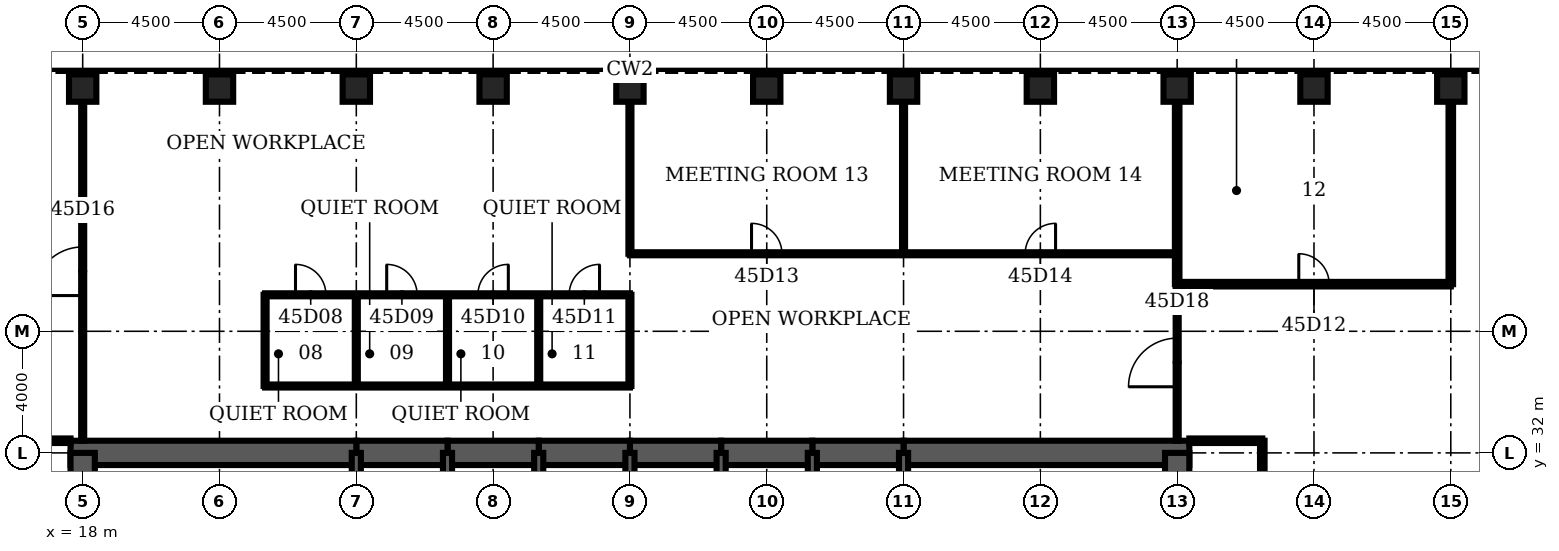
"""IFC4 building model, lengths in metres.
Left out: names, types, materials, properties, quantities, classifications, styles, units other than length and angle.
Written with IfcOpenShell. Run it as: python <this file> out.ifc"""

import sys

from ifc_helpers import new_model, si_unit, direction, frame, frame_2d, origin, origin_2d, place, context, subcontext, project, spatial, rectangle, hollow_rectangle, extrude, element, fill, save


model = new_model("IFC4")
c1 = context("Model", 3, precision=1e-05, world=origin(), true_north=direction((0.0, 1.0)))
c2 = subcontext(c1, "Body", "Model", "MODEL_VIEW")
j1 = project(units=[si_unit("LENGTHUNIT", "METRE"), si_unit("PLANEANGLEUNIT", "RADIAN")], contexts=[c1])
p1 = place(None, origin())
s1 = spatial("IfcSite", under=j1, at=p1, CompositionType="ELEMENT")
p2 = place(p1, origin())
s2 = spatial("IfcBuilding", under=s1, at=p2, CompositionType="ELEMENT")
p3 = place(p2, frame((0.0, 0.0, 202.6)))
s3 = spatial("IfcBuildingStorey", under=s2, at=p3, CompositionType="ELEMENT", Elevation=202.6)
for number, where, z_axis, x_axis in (
    (1, (63.0, 44.0, 0.0), (0.0, 0.0, 1.0), (0.0, 1.0, 0.0)),
    (2, (58.5, 44.0, 0.0), (0.0, 0.0, 1.0), (0.0, 1.0, 0.0)),
    (3, (54.0, 44.0, 0.0), (0.0, 0.0, 1.0), (0.0, 1.0, 0.0)),
    (4, (49.5, 44.0, 0.0), (0.0, 0.0, 1.0), (0.0, 1.0, 0.0)),
    (5, (45.0, 44.0, 0.0), (0.0, 0.0, 1.0), (0.0, 1.0, 0.0)),
    (6, (40.5, 44.0, 0.0), (0.0, 0.0, 1.0), (0.0, 1.0, 0.0)),
    (7, (36.0, 44.0, 0.0), (0.0, 0.0, 1.0), (0.0, 1.0, 0.0)),
    (8, (31.5, 44.0, 0.0), (0.0, 0.0, 1.0), (0.0, 1.0, 0.0)),
    (9, (27.0, 44.0, 0.0), (0.0, 0.0, 1.0), (0.0, 1.0, 0.0)),
    (10, (22.5, 44.0, 0.0), (0.0, 0.0, 1.0), (0.0, 1.0, 0.0)),
    (11, (18.0, 44.0, 0.0), (0.0, 0.0, 1.0), (0.0, 1.0, 0.0)),
):
    element("IfcColumn", number, at=place(p3, frame(where, z_axis=z_axis, x_axis=x_axis)), inside=s3, PredefinedType="COLUMN", context=c2, shape_type="SweptSolid", body=[
        extrude(hollow_rectangle(XDim=0.9, YDim=0.9, WallThickness=0.09, at=origin_2d()), origin(), (0.0, 0.0, 1.0), 4.2),
    ])
p4 = place(p3, frame((54.4, 32.0, 0.0), z_axis=(0.0, 0.0, 1.0), x_axis=(-1.0, 0.0, 0.0)))
e12 = element("IfcWall", 12, at=p4, inside=s3, PredefinedType="SHEAR", context=c2, shape_type="SweptSolid", body=[
    extrude(rectangle(XDim=9.4, YDim=0.8, at=frame_2d((4.7, 0.0))), origin(), (0.0, 0.0, 1.0), 4.2),
])
for number, where, z_axis, x_axis in (
    (13, (45.0, 32.0, 0.0), (0.0, 0.0, 1.0), (-1.0, 0.0, 0.0)),
    (14, (42.0, 32.0, 0.0), (0.0, 0.0, 1.0), (-1.0, 0.0, 0.0)),
    (15, (39.0, 32.0, 0.0), (0.0, 0.0, 1.0), (-1.0, 0.0, 0.0)),
    (16, (36.0, 32.0, 0.0), (0.0, 0.0, 1.0), (-1.0, 0.0, 0.0)),
    (17, (33.0, 32.0, 0.0), (0.0, 0.0, 1.0), (-1.0, 0.0, 0.0)),
    (18, (30.0, 32.0, 0.0), (0.0, 0.0, 1.0), (-1.0, 0.0, 0.0)),
):
    element("IfcWall", number, at=place(p3, frame(where, z_axis=z_axis, x_axis=x_axis)), inside=s3, PredefinedType="SHEAR", context=c2, shape_type="SweptSolid", body=[
        extrude(rectangle(XDim=3.0, YDim=0.8, at=frame_2d((1.5, 0.0))), origin(), (0.0, 0.0, 1.0), 4.2),
    ])
p5 = place(p3, frame((27.0, 32.0, 0.0), z_axis=(0.0, 0.0, 1.0), x_axis=(-1.0, 0.0, 0.0)))
e19 = element("IfcWall", 19, at=p5, inside=s3, PredefinedType="SHEAR", context=c2, shape_type="SweptSolid", body=[
    extrude(rectangle(XDim=9.4, YDim=0.8, at=frame_2d((4.7, 0.0))), origin(), (0.0, 0.0, 1.0), 4.2),
])
for number, where, z_axis, x_axis in (
    (20, (18.0, 32.0, 0.0), (0.0, 0.0, 1.0), (0.0, -1.0, 0.0)),
    (21, (54.0, 28.8, 0.0), (0.0, 0.0, 1.0), (0.0, 1.0, 0.0)),
):
    element("IfcWall", number, at=place(p3, frame(where, z_axis=z_axis, x_axis=x_axis)), inside=s3, PredefinedType="SHEAR", context=c2, shape_type="SweptSolid", body=[
        extrude(rectangle(XDim=3.2, YDim=0.8, at=frame_2d((1.6, 0.0))), origin(), (0.0, 0.0, 1.0), 4.2),
    ])
for number, where, z_axis, x_axis in (
    (22, (27.0, 28.8, 0.0), (0.0, 0.0, 1.0), (0.0, 1.0, 0.0)),
    (23, (30.0, 28.8, 0.0), (0.0, 0.0, 1.0), (0.0, 1.0, 0.0)),
    (24, (33.0, 28.8, 0.0), (0.0, 0.0, 1.0), (0.0, 1.0, 0.0)),
    (25, (36.0, 28.8, 0.0), (0.0, 0.0, 1.0), (0.0, 1.0, 0.0)),
    (26, (39.0, 28.8, 0.0), (0.0, 0.0, 1.0), (0.0, 1.0, 0.0)),
    (27, (42.0, 28.8, 0.0), (0.0, 0.0, 1.0), (0.0, 1.0, 0.0)),
    (28, (45.0, 28.8, 0.0), (0.0, 0.0, 1.0), (0.0, 1.0, 0.0)),
):
    element("IfcWall", number, at=place(p3, frame(where, z_axis=z_axis, x_axis=x_axis)), inside=s3, PredefinedType="SOLIDWALL", context=c2, shape_type="SweptSolid", body=[
        extrude(rectangle(XDim=3.2, YDim=0.3, at=frame_2d((1.6, 0.0))), origin(), (0.0, 0.0, 1.0), 4.2),
    ])
for number, where, z_axis, x_axis in (
    (29, (15.2, 32.4, 0.0), (0.0, 0.0, 1.0), (1.0, 0.0, 0.0)),
    (30, (54.4, 32.4, 0.0), (0.0, 0.0, 1.0), (1.0, 0.0, 0.0)),
):
    element("IfcWall", number, at=place(p3, frame(where, z_axis=z_axis, x_axis=x_axis)), inside=s3, PredefinedType="PARTITIONING", context=c2, shape_type="SweptSolid", body=[
        extrude(rectangle(XDim=2.4, YDim=0.15, at=frame_2d((1.2, 0.0))), origin(), (0.0, 0.0, 1.0), 3.0),
    ])
p6 = place(p3, frame((24.0, 34.2, 0.0), z_axis=(0.0, 0.0, 1.0), x_axis=(1.0, 0.0, 0.0)))
e31 = element("IfcWall", 31, at=p6, inside=s3, PredefinedType="PARTITIONING", context=c2, shape_type="SweptSolid", body=[
    extrude(rectangle(XDim=12.0, YDim=0.1, at=frame_2d((6.0, 0.0))), origin(), (0.0, 0.0, 1.0), 3.0),
])
p7 = place(p3, frame((24.0, 37.2, 0.0), z_axis=(0.0, 0.0, 1.0), x_axis=(1.0, 0.0, 0.0)))
e32 = element("IfcWall", 32, at=p7, inside=s3, PredefinedType="PARTITIONING", context=c2, shape_type="SweptSolid", body=[
    extrude(rectangle(XDim=12.0, YDim=0.1, at=frame_2d((6.0, 0.0))), origin(), (0.0, 0.0, 1.0), 3.0),
])
p8 = place(p7, frame((1.0, 0.0, 0.0)))
e33 = element("IfcOpeningElement", 33, at=p8, cuts=e32, PredefinedType="OPENING", context=c2, shape_type="SweptSolid", body=[
    extrude(rectangle(XDim=1.0, YDim=2.1, at=frame_2d((0.5, 1.05))), frame((0.0, 0.06, 0.0), z_axis=(0.0, -1.0, 0.0), x_axis=(1.0, 0.0, 0.0)), (0.0, 0.0, 1.0), 0.12),
])
p9 = place(p7, frame((4.0, 0.0, 0.0)))
e34 = element("IfcOpeningElement", 34, at=p9, cuts=e32, PredefinedType="OPENING", context=c2, shape_type="SweptSolid", body=[
    extrude(rectangle(XDim=1.0, YDim=2.1, at=frame_2d((0.5, 1.05))), frame((0.0, 0.06, 0.0), z_axis=(0.0, -1.0, 0.0), x_axis=(1.0, 0.0, 0.0)), (0.0, 0.0, 1.0), 0.12),
])
p10 = place(p7, frame((7.0, 0.0, 0.0)))
e35 = element("IfcOpeningElement", 35, at=p10, cuts=e32, PredefinedType="OPENING", context=c2, shape_type="SweptSolid", body=[
    extrude(rectangle(XDim=1.0, YDim=2.1, at=frame_2d((0.5, 1.05))), frame((0.0, 0.06, 0.0), z_axis=(0.0, -1.0, 0.0), x_axis=(1.0, 0.0, 0.0)), (0.0, 0.0, 1.0), 0.12),
])
p11 = place(p7, frame((10.0, 0.0, 0.0)))
e36 = element("IfcOpeningElement", 36, at=p11, cuts=e32, PredefinedType="OPENING", context=c2, shape_type="SweptSolid", body=[
    extrude(rectangle(XDim=1.0, YDim=2.1, at=frame_2d((0.5, 1.05))), frame((0.0, 0.06, 0.0), z_axis=(0.0, -1.0, 0.0), x_axis=(1.0, 0.0, 0.0)), (0.0, 0.0, 1.0), 0.12),
])
p12 = place(p3, frame((54.0, 37.55, 0.0), z_axis=(0.0, 0.0, 1.0), x_axis=(1.0, 0.0, 0.0)))
e37 = element("IfcWall", 37, at=p12, inside=s3, PredefinedType="PARTITIONING", context=c2, shape_type="SweptSolid", body=[
    extrude(rectangle(XDim=9.0, YDim=0.15, at=frame_2d((4.5, 0.0))), origin(), (0.0, 0.0, 1.0), 3.0),
])
p13 = place(p12, frame((4.0, 0.0, 0.0)))
e38 = element("IfcOpeningElement", 38, at=p13, cuts=e37, PredefinedType="OPENING", context=c2, shape_type="SweptSolid", body=[
    extrude(rectangle(XDim=1.0, YDim=2.1, at=frame_2d((0.5, 1.05))), frame((0.0, 0.085, 0.0), z_axis=(0.0, -1.0, 0.0), x_axis=(1.0, 0.0, 0.0)), (0.0, 0.0, 1.0), 0.17),
])
p14 = place(p3, frame((36.0, 38.55, 0.0), z_axis=(0.0, 0.0, 1.0), x_axis=(1.0, 0.0, 0.0)))
e39 = element("IfcWall", 39, at=p14, inside=s3, PredefinedType="PARTITIONING", context=c2, shape_type="SweptSolid", body=[
    extrude(rectangle(XDim=18.0, YDim=0.1, at=frame_2d((9.0, 0.0))), origin(), (0.0, 0.0, 1.0), 3.0),
])
p15 = place(p14, frame((4.0, 0.0, 0.0)))
e40 = element("IfcOpeningElement", 40, at=p15, cuts=e39, PredefinedType="OPENING", context=c2, shape_type="SweptSolid", body=[
    extrude(rectangle(XDim=1.0, YDim=2.1, at=frame_2d((0.5, 1.05))), frame((0.0, 0.06, 0.0), z_axis=(0.0, -1.0, 0.0), x_axis=(1.0, 0.0, 0.0)), (0.0, 0.0, 1.0), 0.12),
])
p16 = place(p14, frame((13.0, 0.0, 0.0)))
e41 = element("IfcOpeningElement", 41, at=p16, cuts=e39, PredefinedType="OPENING", context=c2, shape_type="SweptSolid", body=[
    extrude(rectangle(XDim=1.0, YDim=2.1, at=frame_2d((0.5, 1.05))), frame((0.0, 0.06, 0.0), z_axis=(0.0, -1.0, 0.0), x_axis=(1.0, 0.0, 0.0)), (0.0, 0.0, 1.0), 0.12),
])
p17 = place(p3, frame((18.0, 32.4, 0.0), z_axis=(0.0, 0.0, 1.0), x_axis=(0.0, 1.0, 0.0)))
e42 = element("IfcWall", 42, at=p17, inside=s3, PredefinedType="PARTITIONING", context=c2, shape_type="SweptSolid", body=[
    extrude(rectangle(XDim=11.15, YDim=0.1, at=frame_2d((5.575, 0.0))), origin(), (0.0, 0.0, 1.0), 3.0),
])
p18 = place(p17, frame((4.775, 0.0, 0.0)))
e43 = element("IfcOpeningElement", 43, at=p18, cuts=e42, PredefinedType="OPENING", context=c2, shape_type="SweptSolid", body=[
    extrude(rectangle(XDim=1.6, YDim=2.1, at=frame_2d((0.8, 1.05))), frame((0.0, 0.06, 0.0), z_axis=(0.0, -1.0, 0.0), x_axis=(1.0, 0.0, 0.0)), (0.0, 0.0, 1.0), 0.12),
])
for number, where, z_axis, x_axis in (
    (44, (24.0, 34.2, 0.0), (0.0, 0.0, 1.0), (0.0, 1.0, 0.0)),
    (45, (27.0, 34.2, 0.0), (0.0, 0.0, 1.0), (0.0, 1.0, 0.0)),
    (46, (30.0, 34.2, 0.0), (0.0, 0.0, 1.0), (0.0, 1.0, 0.0)),
    (47, (33.0, 34.2, 0.0), (0.0, 0.0, 1.0), (0.0, 1.0, 0.0)),
    (48, (36.0, 34.2, 0.0), (0.0, 0.0, 1.0), (0.0, 1.0, 0.0)),
):
    element("IfcWall", number, at=place(p3, frame(where, z_axis=z_axis, x_axis=x_axis)), inside=s3, PredefinedType="PARTITIONING", context=c2, shape_type="SweptSolid", body=[
        extrude(rectangle(XDim=3.0, YDim=0.1, at=frame_2d((1.5, 0.0))), origin(), (0.0, 0.0, 1.0), 3.0),
    ])
for number, where, z_axis, x_axis in (
    (49, (36.0, 38.55, 0.0), (0.0, 0.0, 1.0), (0.0, 1.0, 0.0)),
    (50, (45.0, 38.55, 0.0), (0.0, 0.0, 1.0), (0.0, 1.0, 0.0)),
):
    element("IfcWall", number, at=place(p3, frame(where, z_axis=z_axis, x_axis=x_axis)), inside=s3, PredefinedType="PARTITIONING", context=c2, shape_type="SweptSolid", body=[
        extrude(rectangle(XDim=5.0, YDim=0.1, at=frame_2d((2.5, 0.0))), origin(), (0.0, 0.0, 1.0), 3.0),
    ])
p19 = place(p3, frame((54.0, 32.4, 0.0), z_axis=(0.0, 0.0, 1.0), x_axis=(0.0, 1.0, 0.0)))
e51 = element("IfcWall", 51, at=p19, inside=s3, PredefinedType="PARTITIONING", context=c2, shape_type="SweptSolid", body=[
    extrude(rectangle(XDim=5.15, YDim=0.1, at=frame_2d((2.575, 0.0))), origin(), (0.0, 0.0, 1.0), 3.0),
])
p20 = place(p19, frame((1.775, 0.0, 0.0)))
e52 = element("IfcOpeningElement", 52, at=p20, cuts=e51, PredefinedType="OPENING", context=c2, shape_type="SweptSolid", body=[
    extrude(rectangle(XDim=1.6, YDim=2.1, at=frame_2d((0.8, 1.05))), frame((0.0, 0.06, 0.0), z_axis=(0.0, -1.0, 0.0), x_axis=(1.0, 0.0, 0.0)), (0.0, 0.0, 1.0), 0.12),
])
p21 = place(p3, frame((54.0, 37.55, 0.0), z_axis=(0.0, 0.0, 1.0), x_axis=(0.0, 1.0, 0.0)))
e53 = element("IfcWall", 53, at=p21, inside=s3, PredefinedType="PARTITIONING", context=c2, shape_type="SweptSolid", body=[
    extrude(rectangle(XDim=6.0, YDim=0.15, at=frame_2d((3.0, 0.0))), origin(), (0.0, 0.0, 1.0), 3.0),
])
p22 = place(p3, frame((56.8, 13.8, 0.0), z_axis=(0.0, 0.0, 1.0), x_axis=(0.0, 1.0, 0.0)))
e54 = element("IfcWall", 54, at=p22, inside=s3, PredefinedType="PARTITIONING", context=c2, shape_type="SweptSolid", body=[
    extrude(rectangle(XDim=18.6, YDim=0.15, at=frame_2d((9.3, 0.0))), origin(), (0.0, 0.0, 1.0), 3.0),
])
p23 = place(p22, frame((8.7, 0.0, 0.0)))
e55 = element("IfcOpeningElement", 55, at=p23, cuts=e54, PredefinedType="OPENING", context=c2, shape_type="SweptSolid", body=[
    extrude(rectangle(XDim=1.2, YDim=2.1, at=frame_2d((0.6, 1.05))), frame((0.0, 0.085, 0.0), z_axis=(0.0, -1.0, 0.0), x_axis=(1.0, 0.0, 0.0)), (0.0, 0.0, 1.0), 0.17),
])
p24 = place(p3, frame((63.0, 37.55, 0.0), z_axis=(0.0, 0.0, 1.0), x_axis=(0.0, 1.0, 0.0)))
e56 = element("IfcWall", 56, at=p24, inside=s3, PredefinedType="PARTITIONING", context=c2, shape_type="SweptSolid", body=[
    extrude(rectangle(XDim=6.0, YDim=0.15, at=frame_2d((3.0, 0.0))), origin(), (0.0, 0.0, 1.0), 3.0),
])
p25 = place(p8, origin())
e57 = element("IfcDoor", 57, at=p25, inside=s3, OperationType="SINGLE_SWING_LEFT", PredefinedType="DOOR", context=c2, shape_type="SweptSolid", body=[
    extrude(rectangle(XDim=1.0, YDim=2.1, at=frame_2d((0.5, 1.05))), frame((0.0, 0.025, 0.0), z_axis=(0.0, -1.0, 0.0), x_axis=(1.0, 0.0, 0.0)), (0.0, 0.0, 1.0), 0.05),
])
fill(e33, e57)
p26 = place(p9, origin())
e58 = element("IfcDoor", 58, at=p26, inside=s3, OperationType="SINGLE_SWING_LEFT", PredefinedType="DOOR", context=c2, shape_type="SweptSolid", body=[
    extrude(rectangle(XDim=1.0, YDim=2.1, at=frame_2d((0.5, 1.05))), frame((0.0, 0.025, 0.0), z_axis=(0.0, -1.0, 0.0), x_axis=(1.0, 0.0, 0.0)), (0.0, 0.0, 1.0), 0.05),
])
fill(e34, e58)
p27 = place(p10, origin())
e59 = element("IfcDoor", 59, at=p27, inside=s3, OperationType="SINGLE_SWING_RIGHT", PredefinedType="DOOR", context=c2, shape_type="SweptSolid", body=[
    extrude(rectangle(XDim=1.0, YDim=2.1, at=frame_2d((0.5, 1.05))), frame((0.0, 0.025, 0.0), z_axis=(0.0, -1.0, 0.0), x_axis=(1.0, 0.0, 0.0)), (0.0, 0.0, 1.0), 0.05),
])
fill(e35, e59)
p28 = place(p11, origin())
e60 = element("IfcDoor", 60, at=p28, inside=s3, OperationType="SINGLE_SWING_RIGHT", PredefinedType="DOOR", context=c2, shape_type="SweptSolid", body=[
    extrude(rectangle(XDim=1.0, YDim=2.1, at=frame_2d((0.5, 1.05))), frame((0.0, 0.025, 0.0), z_axis=(0.0, -1.0, 0.0), x_axis=(1.0, 0.0, 0.0)), (0.0, 0.0, 1.0), 0.05),
])
fill(e36, e60)
p29 = place(p13, origin())
e61 = element("IfcDoor", 61, at=p29, inside=s3, OperationType="SINGLE_SWING_LEFT", PredefinedType="DOOR", context=c2, shape_type="SweptSolid", body=[
    extrude(rectangle(XDim=1.0, YDim=2.1, at=frame_2d((0.5, 1.05))), frame((0.0, 0.025, 0.0), z_axis=(0.0, -1.0, 0.0), x_axis=(1.0, 0.0, 0.0)), (0.0, 0.0, 1.0), 0.05),
])
fill(e38, e61)
p30 = place(p15, origin())
e62 = element("IfcDoor", 62, at=p30, inside=s3, OperationType="SINGLE_SWING_LEFT", PredefinedType="DOOR", context=c2, shape_type="SweptSolid", body=[
    extrude(rectangle(XDim=1.0, YDim=2.1, at=frame_2d((0.5, 1.05))), frame((0.0, 0.025, 0.0), z_axis=(0.0, -1.0, 0.0), x_axis=(1.0, 0.0, 0.0)), (0.0, 0.0, 1.0), 0.05),
])
fill(e40, e62)
p31 = place(p16, origin())
e63 = element("IfcDoor", 63, at=p31, inside=s3, OperationType="SINGLE_SWING_RIGHT", PredefinedType="DOOR", context=c2, shape_type="SweptSolid", body=[
    extrude(rectangle(XDim=1.0, YDim=2.1, at=frame_2d((0.5, 1.05))), frame((0.0, 0.025, 0.0), z_axis=(0.0, -1.0, 0.0), x_axis=(1.0, 0.0, 0.0)), (0.0, 0.0, 1.0), 0.05),
])
fill(e41, e63)
p32 = place(p18, origin())
e64 = element("IfcDoor", 64, at=p32, inside=s3, OperationType="SINGLE_SWING_LEFT", PredefinedType="DOOR", context=c2, shape_type="SweptSolid", body=[
    extrude(rectangle(XDim=1.6, YDim=2.1, at=frame_2d((0.8, 1.05))), frame((0.0, 0.025, 0.0), z_axis=(0.0, -1.0, 0.0), x_axis=(1.0, 0.0, 0.0)), (0.0, 0.0, 1.0), 0.05),
])
fill(e43, e64)
p33 = place(p20, origin())
e65 = element("IfcDoor", 65, at=p33, inside=s3, OperationType="SINGLE_SWING_LEFT", PredefinedType="DOOR", context=c2, shape_type="SweptSolid", body=[
    extrude(rectangle(XDim=1.6, YDim=2.1, at=frame_2d((0.8, 1.05))), frame((0.0, 0.025, 0.0), z_axis=(0.0, -1.0, 0.0), x_axis=(1.0, 0.0, 0.0)), (0.0, 0.0, 1.0), 0.05),
])
fill(e52, e65)
save(model, sys.argv[1])
